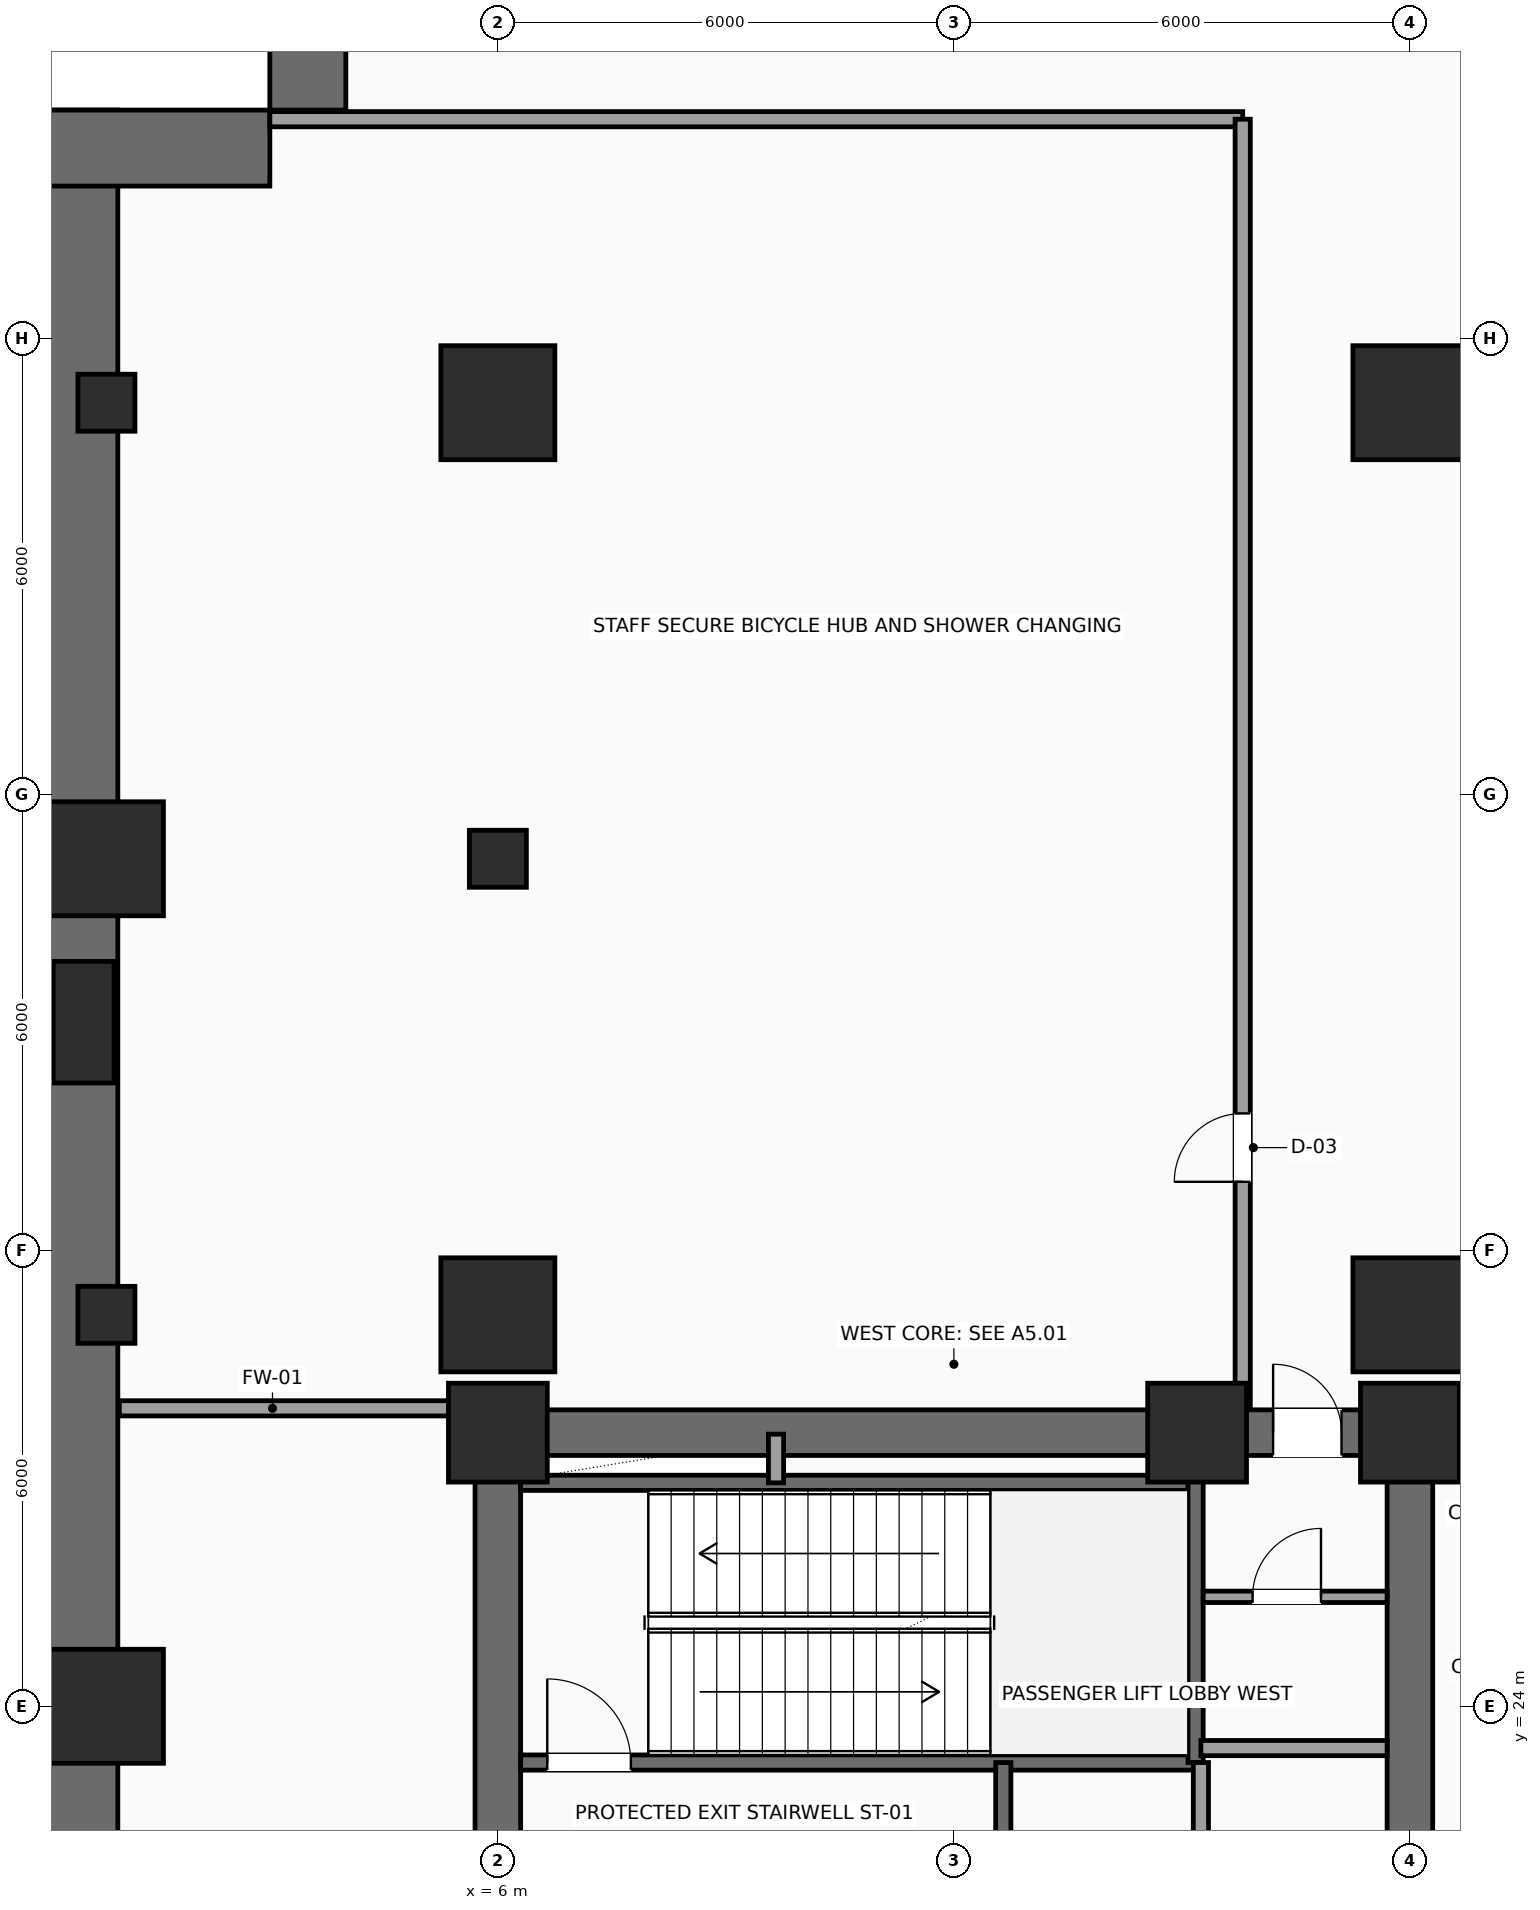
"""IFC4 building model, lengths in metres.
Left out: names, types, materials, properties, quantities, classifications, styles, units other than length and angle.
Written with IfcOpenShell. Run it as: python <this file> out.ifc"""

import sys

from ifc_helpers import new_model, si_unit, direction, frame, frame_2d, origin, origin_2d, place, context, subcontext, project, spatial, rectangle, hollow_rectangle, extrude, element, fill, save


model = new_model("IFC4")
c1 = context("Model", 3, precision=1e-05, world=origin(), true_north=direction((0.0, 1.0)))
c2 = subcontext(c1, "Body", "Model", "MODEL_VIEW")
j1 = project(units=[si_unit("LENGTHUNIT", "METRE"), si_unit("PLANEANGLEUNIT", "RADIAN")], contexts=[c1])
p1 = place(None, origin())
s1 = spatial("IfcSite", under=j1, at=p1, CompositionType="ELEMENT")
p2 = place(p1, origin())
s2 = spatial("IfcBuilding", under=s1, at=p2, CompositionType="ELEMENT")
p3 = place(p2, frame((0.0, 0.0, -4.8)))
s3 = spatial("IfcBuildingStorey", under=s2, at=p3, CompositionType="ELEMENT", Elevation=-4.8)
for number, where, z_axis, x_axis in (
    (1, (6.0, 27.6, 0.0), (0.0, 0.0, 1.0), (1.0, 0.0, 0.0)),
    (2, (15.2, 27.6, 0.0), (0.0, 0.0, 1.0), (1.0, 0.0, 0.0)),
    (3, (18.0, 27.6, 0.0), (0.0, 0.0, 1.0), (1.0, 0.0, 0.0)),
):
    element("IfcColumn", number, at=place(p3, frame(where, z_axis=z_axis, x_axis=x_axis)), inside=s3, PredefinedType="COLUMN", context=c2, shape_type="SweptSolid", body=[
        extrude(rectangle(XDim=1.3, YDim=1.3, at=origin_2d()), origin(), (0.0, 0.0, 1.0), 4.8),
    ])
p4 = place(p3, frame((0.85, 24.0, 0.0), z_axis=(0.0, 0.0, 1.0), x_axis=(1.0, 0.0, 0.0)))
e4 = element("IfcColumn", 4, at=p4, inside=s3, PredefinedType="COLUMN", context=c2, shape_type="SweptSolid", body=[
    extrude(rectangle(XDim=1.5, YDim=1.5, at=origin_2d()), origin(), (0.0, 0.0, 1.0), 4.8),
])
p5 = place(p3, frame((0.85, 29.15, 0.0), z_axis=(0.0, 0.0, 1.0), x_axis=(1.0, 0.0, 0.0)))
e5 = element("IfcColumn", 5, at=p5, inside=s3, PredefinedType="COLUMN", context=c2, shape_type="SweptSolid", body=[
    extrude(hollow_rectangle(XDim=0.75, YDim=0.75, WallThickness=0.035, InnerFilletRadius=0.035, OuterFilletRadius=0.05, at=origin_2d()), origin(), (0.0, 0.0, 1.0), 4.8),
])
p6 = place(p3, frame((0.85, 35.15, 0.0), z_axis=(0.0, 0.0, 1.0), x_axis=(1.0, 0.0, 0.0)))
e6 = element("IfcColumn", 6, at=p6, inside=s3, PredefinedType="COLUMN", context=c2, shape_type="SweptSolid", body=[
    extrude(rectangle(XDim=1.5, YDim=1.5, at=origin_2d()), origin(), (0.0, 0.0, 1.0), 4.8),
])
p7 = place(p3, frame((0.85, 41.15, 0.0), z_axis=(0.0, 0.0, 1.0), x_axis=(1.0, 0.0, 0.0)))
e7 = element("IfcColumn", 7, at=p7, inside=s3, PredefinedType="COLUMN", context=c2, shape_type="SweptSolid", body=[
    extrude(hollow_rectangle(XDim=0.75, YDim=0.75, WallThickness=0.035, InnerFilletRadius=0.035, OuterFilletRadius=0.05, at=origin_2d()), origin(), (0.0, 0.0, 1.0), 4.8),
])
p8 = place(p3, frame((6.0, 29.15, 0.0), z_axis=(0.0, 0.0, 1.0), x_axis=(1.0, 0.0, 0.0)))
e8 = element("IfcColumn", 8, at=p8, inside=s3, PredefinedType="COLUMN", context=c2, shape_type="SweptSolid", body=[
    extrude(rectangle(XDim=1.5, YDim=1.5, at=origin_2d()), origin(), (0.0, 0.0, 1.0), 4.8),
])
p9 = place(p3, frame((6.0, 35.15, 0.0), z_axis=(0.0, 0.0, 1.0), x_axis=(1.0, 0.0, 0.0)))
e9 = element("IfcColumn", 9, at=p9, inside=s3, PredefinedType="COLUMN", context=c2, shape_type="SweptSolid", body=[
    extrude(hollow_rectangle(XDim=0.75, YDim=0.75, WallThickness=0.035, InnerFilletRadius=0.035, OuterFilletRadius=0.05, at=origin_2d()), origin(), (0.0, 0.0, 1.0), 4.8),
])
for number, where, z_axis, x_axis in (
    (10, (6.0, 41.15, 0.0), (0.0, 0.0, 1.0), (1.0, 0.0, 0.0)),
    (11, (18.0, 29.15, 0.0), (0.0, 0.0, 1.0), (1.0, 0.0, 0.0)),
    (12, (18.0, 41.15, 0.0), (0.0, 0.0, 1.0), (1.0, 0.0, 0.0)),
):
    element("IfcColumn", number, at=place(p3, frame(where, z_axis=z_axis, x_axis=x_axis)), inside=s3, PredefinedType="COLUMN", context=c2, shape_type="SweptSolid", body=[
        extrude(rectangle(XDim=1.5, YDim=1.5, at=origin_2d()), origin(), (0.0, 0.0, 1.0), 4.8),
    ])
p10 = place(p3, frame((0.55, 33.0, 0.0), z_axis=(0.0, 0.0, 1.0), x_axis=(1.0, 0.0, 0.0)))
e13 = element("IfcColumn", 13, at=p10, inside=s3, PredefinedType="COLUMN", context=c2, shape_type="SweptSolid", body=[
    extrude(rectangle(XDim=0.8, YDim=1.6, at=origin_2d()), origin(), (0.0, 0.0, 1.0), 4.8),
])
p11 = place(p3, frame((0.5, 3.0, 0.0), z_axis=(0.0, 0.0, 1.0), x_axis=(0.0, 1.0, 0.0)))
e14 = element("IfcWall", 14, at=p11, inside=s3, PredefinedType="USERDEFINED", context=c2, shape_type="SweptSolid", body=[
    extrude(rectangle(XDim=42.0, YDim=1.0, at=frame_2d((21.0, 0.0))), origin(), (0.0, 0.0, 1.0), 4.45),
])
for number, where, z_axis, x_axis in (
    (15, (0.0, 44.5, 0.0), (0.0, 0.0, 1.0), (1.0, 0.0, 0.0)),
    (16, (3.5, 45.0, 0.0), (0.0, 0.0, 1.0), (0.0, 1.0, 0.0)),
):
    element("IfcWall", number, at=place(p3, frame(where, z_axis=z_axis, x_axis=x_axis)), inside=s3, PredefinedType="USERDEFINED", context=c2, shape_type="SweptSolid", body=[
        extrude(rectangle(XDim=3.0, YDim=1.0, at=frame_2d((1.5, 0.0))), origin(), (0.0, 0.0, 1.0), 4.45),
    ])
p12 = place(p3, frame((6.0, 27.6, 0.0), z_axis=(0.0, 0.0, 1.0), x_axis=(1.0, 0.0, 0.0)))
e17 = element("IfcWall", 17, at=p12, inside=s3, PredefinedType="SHEAR", context=c2, shape_type="SweptSolid", body=[
    extrude(rectangle(XDim=12.0, YDim=0.6, at=frame_2d((6.0, 0.0))), origin(), (0.0, 0.0, 1.0), 4.45),
])
p13 = place(p12, frame((10.2, 0.0, 0.0)))
e18 = element("IfcOpeningElement", 18, at=p13, cuts=e17, PredefinedType="OPENING", context=c2, shape_type="SweptSolid", body=[
    extrude(rectangle(XDim=0.9, YDim=2.15, at=frame_2d((0.45, 1.075))), frame((0.0, 0.31, 0.0), z_axis=(0.0, -1.0, 0.0), x_axis=(1.0, 0.0, 0.0)), (0.0, 0.0, 1.0), 0.62),
])
for number, where, z_axis, x_axis in (
    (19, (6.0, 18.0, 0.0), (0.0, 0.0, 1.0), (0.0, 1.0, 0.0)),
    (20, (18.0, 18.0, 0.0), (0.0, 0.0, 1.0), (0.0, 1.0, 0.0)),
):
    element("IfcWall", number, at=place(p3, frame(where, z_axis=z_axis, x_axis=x_axis)), inside=s3, PredefinedType="SHEAR", context=c2, shape_type="SweptSolid", body=[
        extrude(rectangle(XDim=9.6, YDim=0.6, at=frame_2d((4.8, 0.0))), origin(), (0.0, 0.0, 1.0), 4.45),
    ])
p14 = place(p3, frame((6.3, 23.26, 0.0), z_axis=(0.0, 0.0, 1.0), x_axis=(1.0, 0.0, 0.0)))
e21 = element("IfcWall", 21, at=p14, inside=s3, PredefinedType="SHEAR", context=c2, shape_type="SweptSolid", body=[
    extrude(rectangle(XDim=8.88, YDim=0.2, at=frame_2d((4.44, 0.0))), origin(), (0.0, 0.0, 1.0), 4.45),
])
p15 = place(p14, frame((0.35, 0.0, 0.0)))
e22 = element("IfcOpeningElement", 22, at=p15, cuts=e21, PredefinedType="OPENING", context=c2, shape_type="SweptSolid", body=[
    extrude(rectangle(XDim=1.1, YDim=2.2, at=frame_2d((0.55, 1.1))), frame((0.0, 0.11, 0.0), z_axis=(0.0, -1.0, 0.0), x_axis=(1.0, 0.0, 0.0)), (0.0, 0.0, 1.0), 0.22),
])
p16 = place(p3, frame((6.3, 26.94, 0.0), z_axis=(0.0, 0.0, 1.0), x_axis=(1.0, 0.0, 0.0)))
e23 = element("IfcWall", 23, at=p16, inside=s3, PredefinedType="SHEAR", context=c2, shape_type="SweptSolid", body=[
    extrude(rectangle(XDim=8.88, YDim=0.2, at=frame_2d((4.44, 0.0))), origin(), (0.0, 0.0, 1.0), 4.45),
])
p17 = place(p3, frame((15.18, 23.26, 0.0), z_axis=(0.0, 0.0, 1.0), x_axis=(0.0, 1.0, 0.0)))
e24 = element("IfcWall", 24, at=p17, inside=s3, PredefinedType="SHEAR", context=c2, shape_type="SweptSolid", body=[
    extrude(rectangle(XDim=4.04, YDim=0.2, at=frame_2d((2.02, 0.0))), origin(), (0.0, 0.0, 1.0), 4.45),
])
p18 = place(p3, frame((12.65, 20.42, 0.0), z_axis=(0.0, 0.0, 1.0), x_axis=(0.0, 1.0, 0.0)))
e25 = element("IfcWall", 25, at=p18, inside=s3, PredefinedType="SHEAR", context=c2, shape_type="SweptSolid", body=[
    extrude(rectangle(XDim=2.84, YDim=0.2, at=frame_2d((1.42, 0.0))), origin(), (0.0, 0.0, 1.0), 4.45),
])
p19 = place(p18, frame((0.9, 0.0, 0.0)))
e26 = element("IfcOpeningElement", 26, at=p19, cuts=e25, PredefinedType="OPENING", context=c2, shape_type="SweptSolid", body=[
    extrude(rectangle(XDim=0.9, YDim=2.15, at=frame_2d((0.45, 1.075))), frame((0.0, 0.11, 0.0), z_axis=(0.0, -1.0, 0.0), x_axis=(1.0, 0.0, 0.0)), (0.0, 0.0, 1.0), 0.22),
])
p20 = place(p3, frame((9.66, 26.94, 0.0), z_axis=(0.0, 0.0, 1.0), x_axis=(0.0, 1.0, 0.0)))
e27 = element("IfcWall", 27, at=p20, inside=s3, PredefinedType="SOLIDWALL", context=c2, shape_type="SweptSolid", body=[
    extrude(rectangle(XDim=0.64, YDim=0.2, at=frame_2d((0.32, 0.0))), origin(), (0.0, 0.0, 1.0), 4.45),
])
p21 = place(p3, frame((15.25, 18.25, 0.0), z_axis=(0.0, 0.0, 1.0), x_axis=(0.0, 1.0, 0.0)))
e28 = element("IfcWall", 28, at=p21, inside=s3, PredefinedType="SOLIDWALL", context=c2, shape_type="SweptSolid", body=[
    extrude(rectangle(XDim=5.01, YDim=0.2, at=frame_2d((2.505, 0.0))), origin(), (0.0, 0.0, 1.0), 4.45),
])
p22 = place(p21, frame((1.2, 0.0, 0.0)))
e29 = element("IfcOpeningElement", 29, at=p22, cuts=e28, PredefinedType="OPENING", context=c2, shape_type="SweptSolid", body=[
    extrude(rectangle(XDim=0.9, YDim=2.15, at=frame_2d((0.45, 1.075))), frame((0.0, 0.11, 0.0), z_axis=(0.0, -1.0, 0.0), x_axis=(1.0, 0.0, 0.0)), (0.0, 0.0, 1.0), 0.22),
])
p23 = place(p3, frame((15.25, 23.45, 0.0), z_axis=(0.0, 0.0, 1.0), x_axis=(1.0, 0.0, 0.0)))
e30 = element("IfcWall", 30, at=p23, inside=s3, PredefinedType="SOLIDWALL", context=c2, shape_type="SweptSolid", body=[
    extrude(rectangle(XDim=2.45, YDim=0.2, at=frame_2d((1.225, 0.0))), origin(), (0.0, 0.0, 1.0), 4.45),
])
p24 = place(p3, frame((15.28, 25.44, 0.0), z_axis=(0.0, 0.0, 1.0), x_axis=(1.0, 0.0, 0.0)))
e31 = element("IfcWall", 31, at=p24, inside=s3, PredefinedType="PARTITIONING", context=c2, shape_type="SweptSolid", body=[
    extrude(rectangle(XDim=2.42, YDim=0.15, at=frame_2d((1.21, 0.0))), origin(), (0.0, 0.0, 1.0), 4.45),
])
p25 = place(p24, frame((0.65, 0.0, 0.0)))
e32 = element("IfcOpeningElement", 32, at=p25, cuts=e31, PredefinedType="OPENING", context=c2, shape_type="SweptSolid", body=[
    extrude(rectangle(XDim=0.9, YDim=2.15, at=frame_2d((0.45, 1.075))), frame((0.0, 0.085, 0.0), z_axis=(0.0, -1.0, 0.0), x_axis=(1.0, 0.0, 0.0)), (0.0, 0.0, 1.0), 0.17),
])
p26 = place(p3, frame((1.02, 27.92, 0.0), z_axis=(0.0, 0.0, 1.0), x_axis=(1.0, 0.0, 0.0)))
e33 = element("IfcWall", 33, at=p26, inside=s3, PredefinedType="SOLIDWALL", context=c2, shape_type="SweptSolid", body=[
    extrude(rectangle(XDim=4.98, YDim=0.2, at=frame_2d((2.49, 0.0))), origin(), (0.0, 0.0, 1.0), 4.45),
])
p27 = place(p3, frame((3.0, 44.88, 0.0), z_axis=(0.0, 0.0, 1.0), x_axis=(1.0, 0.0, 0.0)))
e34 = element("IfcWall", 34, at=p27, inside=s3, PredefinedType="SOLIDWALL", context=c2, shape_type="SweptSolid", body=[
    extrude(rectangle(XDim=12.8, YDim=0.2, at=frame_2d((6.4, 0.0))), origin(), (0.0, 0.0, 1.0), 4.45),
])
p28 = place(p3, frame((15.8, 27.92, 0.0), z_axis=(0.0, 0.0, 1.0), x_axis=(0.0, 1.0, 0.0)))
e35 = element("IfcWall", 35, at=p28, inside=s3, PredefinedType="SOLIDWALL", context=c2, shape_type="SweptSolid", body=[
    extrude(rectangle(XDim=16.96, YDim=0.2, at=frame_2d((8.48, 0.0))), origin(), (0.0, 0.0, 1.0), 4.45),
])
p29 = place(p28, frame((2.98, 0.0, 0.0)))
e36 = element("IfcOpeningElement", 36, at=p29, cuts=e35, PredefinedType="OPENING", context=c2, shape_type="SweptSolid", body=[
    extrude(rectangle(XDim=0.9, YDim=2.15, at=frame_2d((0.45, 1.075))), frame((0.0, 0.11, 0.0), z_axis=(0.0, -1.0, 0.0), x_axis=(1.0, 0.0, 0.0)), (0.0, 0.0, 1.0), 0.22),
])
p30 = place(p13, origin())
e37 = element("IfcDoor", 37, at=p30, inside=s3, OperationType="SINGLE_SWING_LEFT", PredefinedType="DOOR", context=c2, shape_type="SweptSolid", body=[
    extrude(rectangle(XDim=0.9, YDim=2.15, at=frame_2d((0.45, 1.075))), frame((0.0, 0.025, 0.0), z_axis=(0.0, -1.0, 0.0), x_axis=(1.0, 0.0, 0.0)), (0.0, 0.0, 1.0), 0.05),
])
fill(e18, e37)
p31 = place(p15, origin())
e38 = element("IfcDoor", 38, at=p31, inside=s3, OperationType="SINGLE_SWING_LEFT", PredefinedType="DOOR", context=c2, shape_type="SweptSolid", body=[
    extrude(rectangle(XDim=1.1, YDim=2.2, at=frame_2d((0.55, 1.1))), frame((0.0, 0.025, 0.0), z_axis=(0.0, -1.0, 0.0), x_axis=(1.0, 0.0, 0.0)), (0.0, 0.0, 1.0), 0.05),
])
fill(e22, e38)
p32 = place(p25, origin())
e39 = element("IfcDoor", 39, at=p32, inside=s3, OperationType="SINGLE_SWING_RIGHT", PredefinedType="DOOR", context=c2, shape_type="SweptSolid", body=[
    extrude(rectangle(XDim=0.9, YDim=2.15, at=frame_2d((0.45, 1.075))), frame((0.0, 0.025, 0.0), z_axis=(0.0, -1.0, 0.0), x_axis=(1.0, 0.0, 0.0)), (0.0, 0.0, 1.0), 0.05),
])
fill(e32, e39)
p33 = place(p29, origin())
e40 = element("IfcDoor", 40, at=p33, inside=s3, OperationType="SINGLE_SWING_LEFT", PredefinedType="DOOR", context=c2, shape_type="SweptSolid", body=[
    extrude(rectangle(XDim=0.9, YDim=2.15, at=frame_2d((0.45, 1.075))), frame((0.0, 0.025, 0.0), z_axis=(0.0, -1.0, 0.0), x_axis=(1.0, 0.0, 0.0)), (0.0, 0.0, 1.0), 0.05),
])
fill(e36, e40)
save(model, sys.argv[1])
